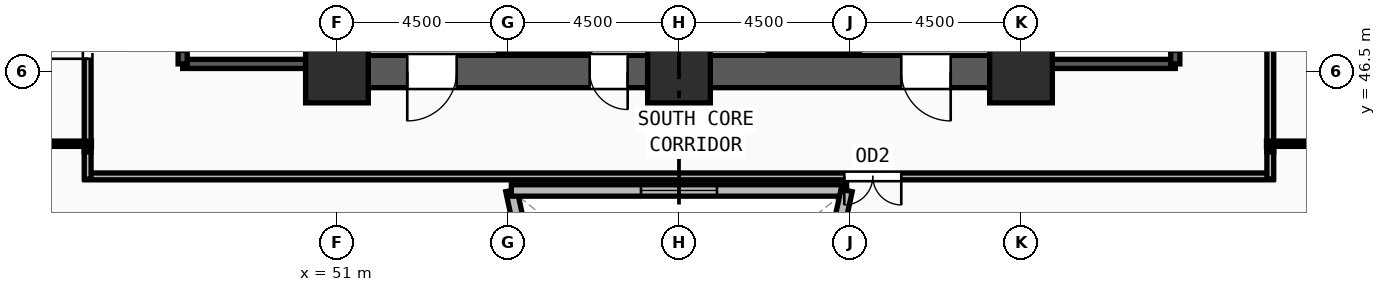
"""IFC4 building model, lengths in metres.
Left out: names, types, materials, properties, quantities, classifications, styles, units other than length and angle.
Written with IfcOpenShell. Run it as: python <this file> out.ifc"""

import sys

from ifc_helpers import new_model, si_unit, direction, frame, frame_2d, origin, origin_2d, place, context, subcontext, project, spatial, rectangle, extrude, source, transform, mapped, element, fill, save


model = new_model("IFC4")
c1 = context("Model", 3, precision=1e-05, world=origin(), true_north=direction((0.0, 1.0)))
c2 = subcontext(c1, "Body", "Model", "MODEL_VIEW")
j1 = project(units=[si_unit("LENGTHUNIT", "METRE"), si_unit("PLANEANGLEUNIT", "RADIAN")], contexts=[c1])
p1 = place(None, origin())
s1 = spatial("IfcSite", under=j1, at=p1, CompositionType="ELEMENT")
p2 = place(p1, origin())
s2 = spatial("IfcBuilding", under=s1, at=p2, CompositionType="ELEMENT")
p3 = place(p2, frame((0.0, 0.0, 28.5)))
s3 = spatial("IfcBuildingStorey", under=s2, at=p3, CompositionType="ELEMENT", Elevation=28.5)
m1 = source(origin(), c2, "Body", "SweptSolid", [
    extrude(rectangle(XDim=1.65, YDim=1.65, at=origin_2d()), origin(), (0.0, 0.0, 1.0), 3.75),
])
for number, where, z_axis, x_axis in (
    (1, (51.0, 46.5, 0.0), (0.0, 0.0, 1.0), (1.0, 0.0, 0.0)),
    (2, (60.0, 46.5, 0.0), (0.0, 0.0, 1.0), (1.0, 0.0, 0.0)),
    (3, (69.0, 46.5, 0.0), (0.0, 0.0, 1.0), (1.0, 0.0, 0.0)),
):
    element("IfcColumn", number, at=place(p3, frame(where, z_axis=z_axis, x_axis=x_axis)), inside=s3, PredefinedType="COLUMN", context=c2, shape_type="MappedRepresentation", body=[
        mapped(m1, transform((0.0, 0.0, 0.0), x_axis=(1.0, 0.0, 0.0), y_axis=(0.0, 1.0, 0.0), z_axis=(0.0, 0.0, 1.0), scale=1.0)),
    ])
p4 = place(p3, frame((68.175, 46.5, 0.0), z_axis=(0.0, 0.0, 1.0), x_axis=(-1.0, 0.0, 0.0)))
e4 = element("IfcWall", 4, at=p4, inside=s3, PredefinedType="SHEAR", context=c2, shape_type="SweptSolid", body=[
    extrude(rectangle(XDim=7.35, YDim=0.85, at=frame_2d((3.675, 0.0))), origin(), (0.0, 0.0, 1.0), 3.57),
])
m2 = source(origin(), c2, "Body", "SweptSolid", [
    extrude(rectangle(XDim=1.3, YDim=2.2, at=frame_2d((0.65, 1.1))), frame((0.0, 0.435, 0.0), z_axis=(0.0, -1.0, 0.0), x_axis=(1.0, 0.0, 0.0)), (0.0, 0.0, 1.0), 0.87),
])
p5 = place(p4, frame((1.025, 0.0, 0.0)))
e5 = element("IfcOpeningElement", 5, at=p5, cuts=e4, PredefinedType="OPENING", context=c2, shape_type="MappedRepresentation", body=[
    mapped(m2, transform((0.0, 0.0, 0.0), x_axis=(1.0, 0.0, 0.0), y_axis=(0.0, 1.0, 0.0), z_axis=(0.0, 0.0, 1.0), scale=1.0)),
])
p6 = place(p3, frame((59.175, 46.5, 0.0), z_axis=(0.0, 0.0, 1.0), x_axis=(-1.0, 0.0, 0.0)))
e6 = element("IfcWall", 6, at=p6, inside=s3, PredefinedType="SHEAR", context=c2, shape_type="SweptSolid", body=[
    extrude(rectangle(XDim=7.35, YDim=0.85, at=frame_2d((3.675, 0.0))), origin(), (0.0, 0.0, 1.0), 3.57),
])
p7 = place(p6, frame((5.025, 0.0, 0.0)))
e7 = element("IfcOpeningElement", 7, at=p7, cuts=e6, PredefinedType="OPENING", context=c2, shape_type="MappedRepresentation", body=[
    mapped(m2, transform((0.0, 0.0, 0.0), x_axis=(1.0, 0.0, 0.0), y_axis=(0.0, 1.0, 0.0), z_axis=(0.0, 0.0, 1.0), scale=1.0)),
])
m3 = source(origin(), c2, "Body", "SweptSolid", [
    extrude(rectangle(XDim=1.0, YDim=2.2, at=frame_2d((0.5, 1.1))), frame((0.0, 0.435, 0.0), z_axis=(0.0, -1.0, 0.0), x_axis=(1.0, 0.0, 0.0)), (0.0, 0.0, 1.0), 0.87),
])
p8 = place(p6, frame((0.525, 0.0, 0.0)))
e8 = element("IfcOpeningElement", 8, at=p8, cuts=e6, PredefinedType="OPENING", context=c2, shape_type="MappedRepresentation", body=[
    mapped(m3, transform((0.0, 0.0, 0.0), x_axis=(1.0, 0.0, 0.0), y_axis=(0.0, 1.0, 0.0), z_axis=(0.0, 0.0, 1.0), scale=1.0)),
])
p9 = place(p3, frame((46.94, 46.7, 0.0), z_axis=(0.0, 0.0, 1.0), x_axis=(1.0, 0.0, 0.0)))
e9 = element("IfcWall", 9, at=p9, inside=s3, PredefinedType="SOLIDWALL", context=c2, shape_type="SweptSolid", body=[
    extrude(rectangle(XDim=3.44, YDim=0.24, at=frame_2d((1.72, 0.0))), origin(), (0.0, 0.0, 1.0), 3.57),
])
p10 = place(p3, frame((50.38, 46.7, 0.0), z_axis=(0.0, 0.0, 1.0), x_axis=(0.0, 1.0, 0.0)))
e10 = element("IfcWall", 10, at=p10, inside=s3, PredefinedType="SOLIDWALL", context=c2, shape_type="SweptSolid", body=[
    extrude(rectangle(XDim=7.82, YDim=0.24, at=frame_2d((3.91, 0.0))), origin(), (0.0, 0.0, 1.0), 3.57),
])
p11 = place(p3, frame((46.94, 54.52, 0.0), z_axis=(0.0, 0.0, 1.0), x_axis=(0.0, -1.0, 0.0)))
e11 = element("IfcWall", 11, at=p11, inside=s3, PredefinedType="SOLIDWALL", context=c2, shape_type="SweptSolid", body=[
    extrude(rectangle(XDim=7.82, YDim=0.24, at=frame_2d((3.91, 0.0))), origin(), (0.0, 0.0, 1.0), 3.57),
])
m4 = source(origin(), c2, "Body", "SweptSolid", [
    extrude(rectangle(XDim=1.2, YDim=2.2, at=frame_2d((0.6, 1.1))), frame((0.0, 0.13, 0.0), z_axis=(0.0, -1.0, 0.0), x_axis=(1.0, 0.0, 0.0)), (0.0, 0.0, 1.0), 0.26),
])
p12 = place(p11, frame((6.3, 0.0, 0.0)))
e12 = element("IfcOpeningElement", 12, at=p12, cuts=e11, PredefinedType="OPENING", context=c2, shape_type="MappedRepresentation", body=[
    mapped(m4, transform((0.0, 0.0, 0.0), x_axis=(1.0, 0.0, 0.0), y_axis=(0.0, 1.0, 0.0), z_axis=(0.0, 0.0, 1.0), scale=1.0)),
])
p13 = place(p3, frame((69.62, 46.7, 0.0), z_axis=(0.0, 0.0, 1.0), x_axis=(1.0, 0.0, 0.0)))
e13 = element("IfcWall", 13, at=p13, inside=s3, PredefinedType="SOLIDWALL", context=c2, shape_type="SweptSolid", body=[
    extrude(rectangle(XDim=3.44, YDim=0.24, at=frame_2d((1.72, 0.0))), origin(), (0.0, 0.0, 1.0), 3.57),
])
p14 = place(p3, frame((73.06, 46.7, 0.0), z_axis=(0.0, 0.0, 1.0), x_axis=(0.0, 1.0, 0.0)))
e14 = element("IfcWall", 14, at=p14, inside=s3, PredefinedType="SOLIDWALL", context=c2, shape_type="SweptSolid", body=[
    extrude(rectangle(XDim=7.82, YDim=0.24, at=frame_2d((3.91, 0.0))), origin(), (0.0, 0.0, 1.0), 3.57),
])
p15 = place(p14, frame((0.32, 0.0, 0.0)))
e15 = element("IfcOpeningElement", 15, at=p15, cuts=e14, PredefinedType="OPENING", context=c2, shape_type="MappedRepresentation", body=[
    mapped(m4, transform((0.0, 0.0, 0.0), x_axis=(1.0, 0.0, 0.0), y_axis=(0.0, 1.0, 0.0), z_axis=(0.0, 0.0, 1.0), scale=1.0)),
])
p16 = place(p3, frame((69.62, 54.52, 0.0), z_axis=(0.0, 0.0, 1.0), x_axis=(0.0, -1.0, 0.0)))
e16 = element("IfcWall", 16, at=p16, inside=s3, PredefinedType="SOLIDWALL", context=c2, shape_type="SweptSolid", body=[
    extrude(rectangle(XDim=7.82, YDim=0.24, at=frame_2d((3.91, 0.0))), origin(), (0.0, 0.0, 1.0), 3.57),
])
p17 = place(p3, frame((57.133, 36.23, 0.0), z_axis=(0.0, 0.0, 1.0), x_axis=(-0.211350050716, 0.97741043378, 0.0)))
e17 = element("IfcWall", 17, at=p17, inside=s3, PredefinedType="SOLIDWALL", context=c2, shape_type="SweptSolid", body=[
    extrude(rectangle(XDim=7.305, YDim=0.3, at=frame_2d((3.653, 0.0))), origin(), (0.0, 0.0, 1.0), 3.57),
])
m5 = source(origin(), c2, "Body", "SweptSolid", [
    extrude(rectangle(XDim=2.0, YDim=1.9, at=frame_2d((1.0, 0.95))), frame((0.0, 0.16, 0.0), z_axis=(0.0, -1.0, 0.0), x_axis=(1.0, 0.0, 0.0)), (0.0, 0.0, 1.0), 0.32),
])
p18 = place(p17, frame((2.653, 0.0, 0.55)))
e18 = element("IfcOpeningElement", 18, at=p18, cuts=e17, PredefinedType="OPENING", context=c2, shape_type="MappedRepresentation", body=[
    mapped(m5, transform((0.0, 0.0, 0.0), x_axis=(1.0, 0.0, 0.0), y_axis=(0.0, 1.0, 0.0), z_axis=(0.0, 0.0, 1.0), scale=1.0)),
])
p19 = place(p3, frame((55.589, 43.37, 0.0), z_axis=(0.0, 0.0, 1.0), x_axis=(1.0, 0.0, 0.0)))
e19 = element("IfcWall", 19, at=p19, inside=s3, PredefinedType="SOLIDWALL", context=c2, shape_type="SweptSolid", body=[
    extrude(rectangle(XDim=8.822, YDim=0.3, at=frame_2d((4.411, 0.0))), origin(), (0.0, 0.0, 1.0), 3.57),
])
p20 = place(p19, frame((3.411, 0.0, 0.55)))
e20 = element("IfcOpeningElement", 20, at=p20, cuts=e19, PredefinedType="OPENING", context=c2, shape_type="MappedRepresentation", body=[
    mapped(m5, transform((0.0, 0.0, 0.0), x_axis=(1.0, 0.0, 0.0), y_axis=(0.0, 1.0, 0.0), z_axis=(0.0, 0.0, 1.0), scale=1.0)),
])
p21 = place(p3, frame((64.411, 43.37, 0.0), z_axis=(0.0, 0.0, 1.0), x_axis=(-0.211350050716, -0.97741043378, 0.0)))
e21 = element("IfcWall", 21, at=p21, inside=s3, PredefinedType="SOLIDWALL", context=c2, shape_type="SweptSolid", body=[
    extrude(rectangle(XDim=7.305, YDim=0.3, at=frame_2d((3.653, 0.0))), origin(), (0.0, 0.0, 1.0), 3.57),
])
p22 = place(p21, frame((2.653, 0.0, 0.55)))
e22 = element("IfcOpeningElement", 22, at=p22, cuts=e21, PredefinedType="OPENING", context=c2, shape_type="MappedRepresentation", body=[
    mapped(m5, transform((0.0, 0.0, 0.0), x_axis=(1.0, 0.0, 0.0), y_axis=(0.0, 1.0, 0.0), z_axis=(0.0, 0.0, 1.0), scale=1.0)),
])
p23 = place(p3, frame((44.44, 44.385, 0.0), z_axis=(0.0, 0.0, 1.0), x_axis=(0.0, 1.0, 0.0)))
e23 = element("IfcWall", 23, at=p23, inside=s3, PredefinedType="PARTITIONING", context=c2, shape_type="SweptSolid", body=[
    extrude(rectangle(XDim=5.9, YDim=0.18, at=frame_2d((2.95, 0.0))), origin(), (0.0, 0.0, 1.0), 3.57),
])
m6 = source(origin(), c2, "Body", "SweptSolid", [
    extrude(rectangle(XDim=1.0, YDim=2.2, at=frame_2d((0.5, 1.1))), frame((0.0, 0.1, 0.0), z_axis=(0.0, -1.0, 0.0), x_axis=(1.0, 0.0, 0.0)), (0.0, 0.0, 1.0), 0.2),
])
p24 = place(p23, frame((2.45, 0.0, 0.0)))
e24 = element("IfcOpeningElement", 24, at=p24, cuts=e23, PredefinedType="OPENING", context=c2, shape_type="MappedRepresentation", body=[
    mapped(m6, transform((0.0, 0.0, 0.0), x_axis=(1.0, 0.0, 0.0), y_axis=(0.0, 1.0, 0.0), z_axis=(0.0, 0.0, 1.0), scale=1.0)),
])
p25 = place(p3, frame((75.63, 43.74, 0.0), z_axis=(0.0, 0.0, 1.0), x_axis=(-1.0, 0.0, 0.0)))
e25 = element("IfcWall", 25, at=p25, inside=s3, PredefinedType="PARTITIONING", context=c2, shape_type="SweptSolid", body=[
    extrude(rectangle(XDim=31.26, YDim=0.18, at=frame_2d((15.63, 0.0))), origin(), (0.0, 0.0, 1.0), 3.57),
])
m7 = source(origin(), c2, "Body", "SweptSolid", [
    extrude(rectangle(XDim=1.5, YDim=2.2, at=frame_2d((0.75, 1.1))), frame((0.0, 0.1, 0.0), z_axis=(0.0, -1.0, 0.0), x_axis=(1.0, 0.0, 0.0)), (0.0, 0.0, 1.0), 0.2),
])
p26 = place(p25, frame((9.78, 0.0, 0.0)))
e26 = element("IfcOpeningElement", 26, at=p26, cuts=e25, PredefinedType="OPENING", context=c2, shape_type="MappedRepresentation", body=[
    mapped(m7, transform((0.0, 0.0, 0.0), x_axis=(1.0, 0.0, 0.0), y_axis=(0.0, 1.0, 0.0), z_axis=(0.0, 0.0, 1.0), scale=1.0)),
])
p27 = place(p3, frame((75.56, 51.785, 0.0), z_axis=(0.0, 0.0, 1.0), x_axis=(0.0, -1.0, 0.0)))
e27 = element("IfcWall", 27, at=p27, inside=s3, PredefinedType="PARTITIONING", context=c2, shape_type="SweptSolid", body=[
    extrude(rectangle(XDim=7.4, YDim=0.18, at=frame_2d((3.7, 0.0))), origin(), (0.0, 0.0, 1.0), 3.57),
])
p28 = place(p27, frame((3.2, 0.0, 0.0)))
e28 = element("IfcOpeningElement", 28, at=p28, cuts=e27, PredefinedType="OPENING", context=c2, shape_type="MappedRepresentation", body=[
    mapped(m6, transform((0.0, 0.0, 0.0), x_axis=(1.0, 0.0, 0.0), y_axis=(0.0, 1.0, 0.0), z_axis=(0.0, 0.0, 1.0), scale=1.0)),
])
for number, where, z_axis, x_axis in (
    (29, (44.44, 43.67, 0.0), (0.0, 0.0, 1.0), (0.0, 1.0, 0.0)),
    (30, (75.56, 44.385, 0.0), (0.0, 0.0, 1.0), (0.0, -1.0, 0.0)),
):
    element("IfcWall", number, at=place(p3, frame(where, z_axis=z_axis, x_axis=x_axis)), inside=s3, PredefinedType="PARTITIONING", context=c2, shape_type="SweptSolid", body=[
        extrude(rectangle(XDim=0.715, YDim=0.18, at=frame_2d((0.357, 0.0))), origin(), (0.0, 0.0, 1.0), 3.57),
    ])
p29 = place(p3, frame((44.54, 44.6, 0.0), z_axis=(0.0, 0.0, 1.0), x_axis=(-1.0, 0.0, 0.0)))
e31 = element("IfcWall", 31, at=p29, inside=s3, PredefinedType="PARTITIONING", context=c2, shape_type="SweptSolid", body=[
    extrude(rectangle(XDim=12.041, YDim=0.14, at=frame_2d((6.021, 0.0))), origin(), (0.0, 0.0, 1.0), 3.57),
])
p30 = place(p3, frame((75.46, 44.6, 0.0), z_axis=(0.0, 0.0, 1.0), x_axis=(1.0, 0.0, 0.0)))
e32 = element("IfcWall", 32, at=p30, inside=s3, PredefinedType="PARTITIONING", context=c2, shape_type="SweptSolid", body=[
    extrude(rectangle(XDim=12.379, YDim=0.14, at=frame_2d((6.189, 0.0))), origin(), (0.0, 0.0, 1.0), 2.705),
])
m8 = source(origin(), c2, "Body", "SweptSolid", [
    extrude(rectangle(XDim=1.3, YDim=2.2, at=frame_2d((0.65, 1.1))), frame((0.0, 0.025, 0.0), z_axis=(0.0, -1.0, 0.0), x_axis=(1.0, 0.0, 0.0)), (0.0, 0.0, 1.0), 0.05),
])
p31 = place(p7, origin())
e33 = element("IfcDoor", 33, at=p31, inside=s3, OperationType="SINGLE_SWING_RIGHT", PredefinedType="DOOR", context=c2, shape_type="MappedRepresentation", body=[
    mapped(m8, transform((0.0, 0.0, 0.0), x_axis=(1.0, 0.0, 0.0), y_axis=(0.0, 1.0, 0.0), z_axis=(0.0, 0.0, 1.0), scale=1.0)),
])
fill(e7, e33)
m9 = source(origin(), c2, "Body", "SweptSolid", [
    extrude(rectangle(XDim=1.0, YDim=2.2, at=frame_2d((0.5, 1.1))), frame((0.0, 0.025, 0.0), z_axis=(0.0, -1.0, 0.0), x_axis=(1.0, 0.0, 0.0)), (0.0, 0.0, 1.0), 0.05),
])
p32 = place(p8, origin())
e34 = element("IfcDoor", 34, at=p32, inside=s3, OperationType="SINGLE_SWING_LEFT", PredefinedType="DOOR", context=c2, shape_type="MappedRepresentation", body=[
    mapped(m9, transform((0.0, 0.0, 0.0), x_axis=(1.0, 0.0, 0.0), y_axis=(0.0, 1.0, 0.0), z_axis=(0.0, 0.0, 1.0), scale=1.0)),
])
fill(e8, e34)
p33 = place(p5, origin())
e35 = element("IfcDoor", 35, at=p33, inside=s3, OperationType="SINGLE_SWING_LEFT", PredefinedType="DOOR", context=c2, shape_type="MappedRepresentation", body=[
    mapped(m8, transform((0.0, 0.0, 0.0), x_axis=(1.0, 0.0, 0.0), y_axis=(0.0, 1.0, 0.0), z_axis=(0.0, 0.0, 1.0), scale=1.0)),
])
fill(e5, e35)
m10 = source(origin(), c2, "Body", "SweptSolid", [
    extrude(rectangle(XDim=2.0, YDim=1.9, at=frame_2d((1.0, 0.95))), frame((0.0, 0.03, 0.0), z_axis=(0.0, -1.0, 0.0), x_axis=(1.0, 0.0, 0.0)), (0.0, 0.0, 1.0), 0.06),
])
p34 = place(p20, origin())
e36 = element("IfcWindow", 36, at=p34, inside=s3, PartitioningType="DOUBLE_PANEL_VERTICAL", PredefinedType="WINDOW", context=c2, shape_type="MappedRepresentation", body=[
    mapped(m10, transform((0.0, 0.0, 0.0), x_axis=(1.0, 0.0, 0.0), y_axis=(0.0, 1.0, 0.0), z_axis=(0.0, 0.0, 1.0), scale=1.0)),
])
fill(e20, e36)
p35 = place(p24, origin())
e37 = element("IfcDoor", 37, at=p35, inside=s3, OperationType="SINGLE_SWING_LEFT", PredefinedType="DOOR", context=c2, shape_type="MappedRepresentation", body=[
    mapped(m9, transform((0.0, 0.0, 0.0), x_axis=(1.0, 0.0, 0.0), y_axis=(0.0, 1.0, 0.0), z_axis=(0.0, 0.0, 1.0), scale=1.0)),
])
fill(e24, e37)
m11 = source(origin(), c2, "Body", "SweptSolid", [
    extrude(rectangle(XDim=1.5, YDim=2.2, at=frame_2d((0.75, 1.1))), frame((0.0, 0.025, 0.0), z_axis=(0.0, -1.0, 0.0), x_axis=(1.0, 0.0, 0.0)), (0.0, 0.0, 1.0), 0.05),
])
p36 = place(p26, origin())
e38 = element("IfcDoor", 38, at=p36, inside=s3, OperationType="DOUBLE_DOOR_SINGLE_SWING", PredefinedType="DOOR", context=c2, shape_type="MappedRepresentation", body=[
    mapped(m11, transform((0.0, 0.0, 0.0), x_axis=(1.0, 0.0, 0.0), y_axis=(0.0, 1.0, 0.0), z_axis=(0.0, 0.0, 1.0), scale=1.0)),
])
fill(e26, e38)
save(model, sys.argv[1])
